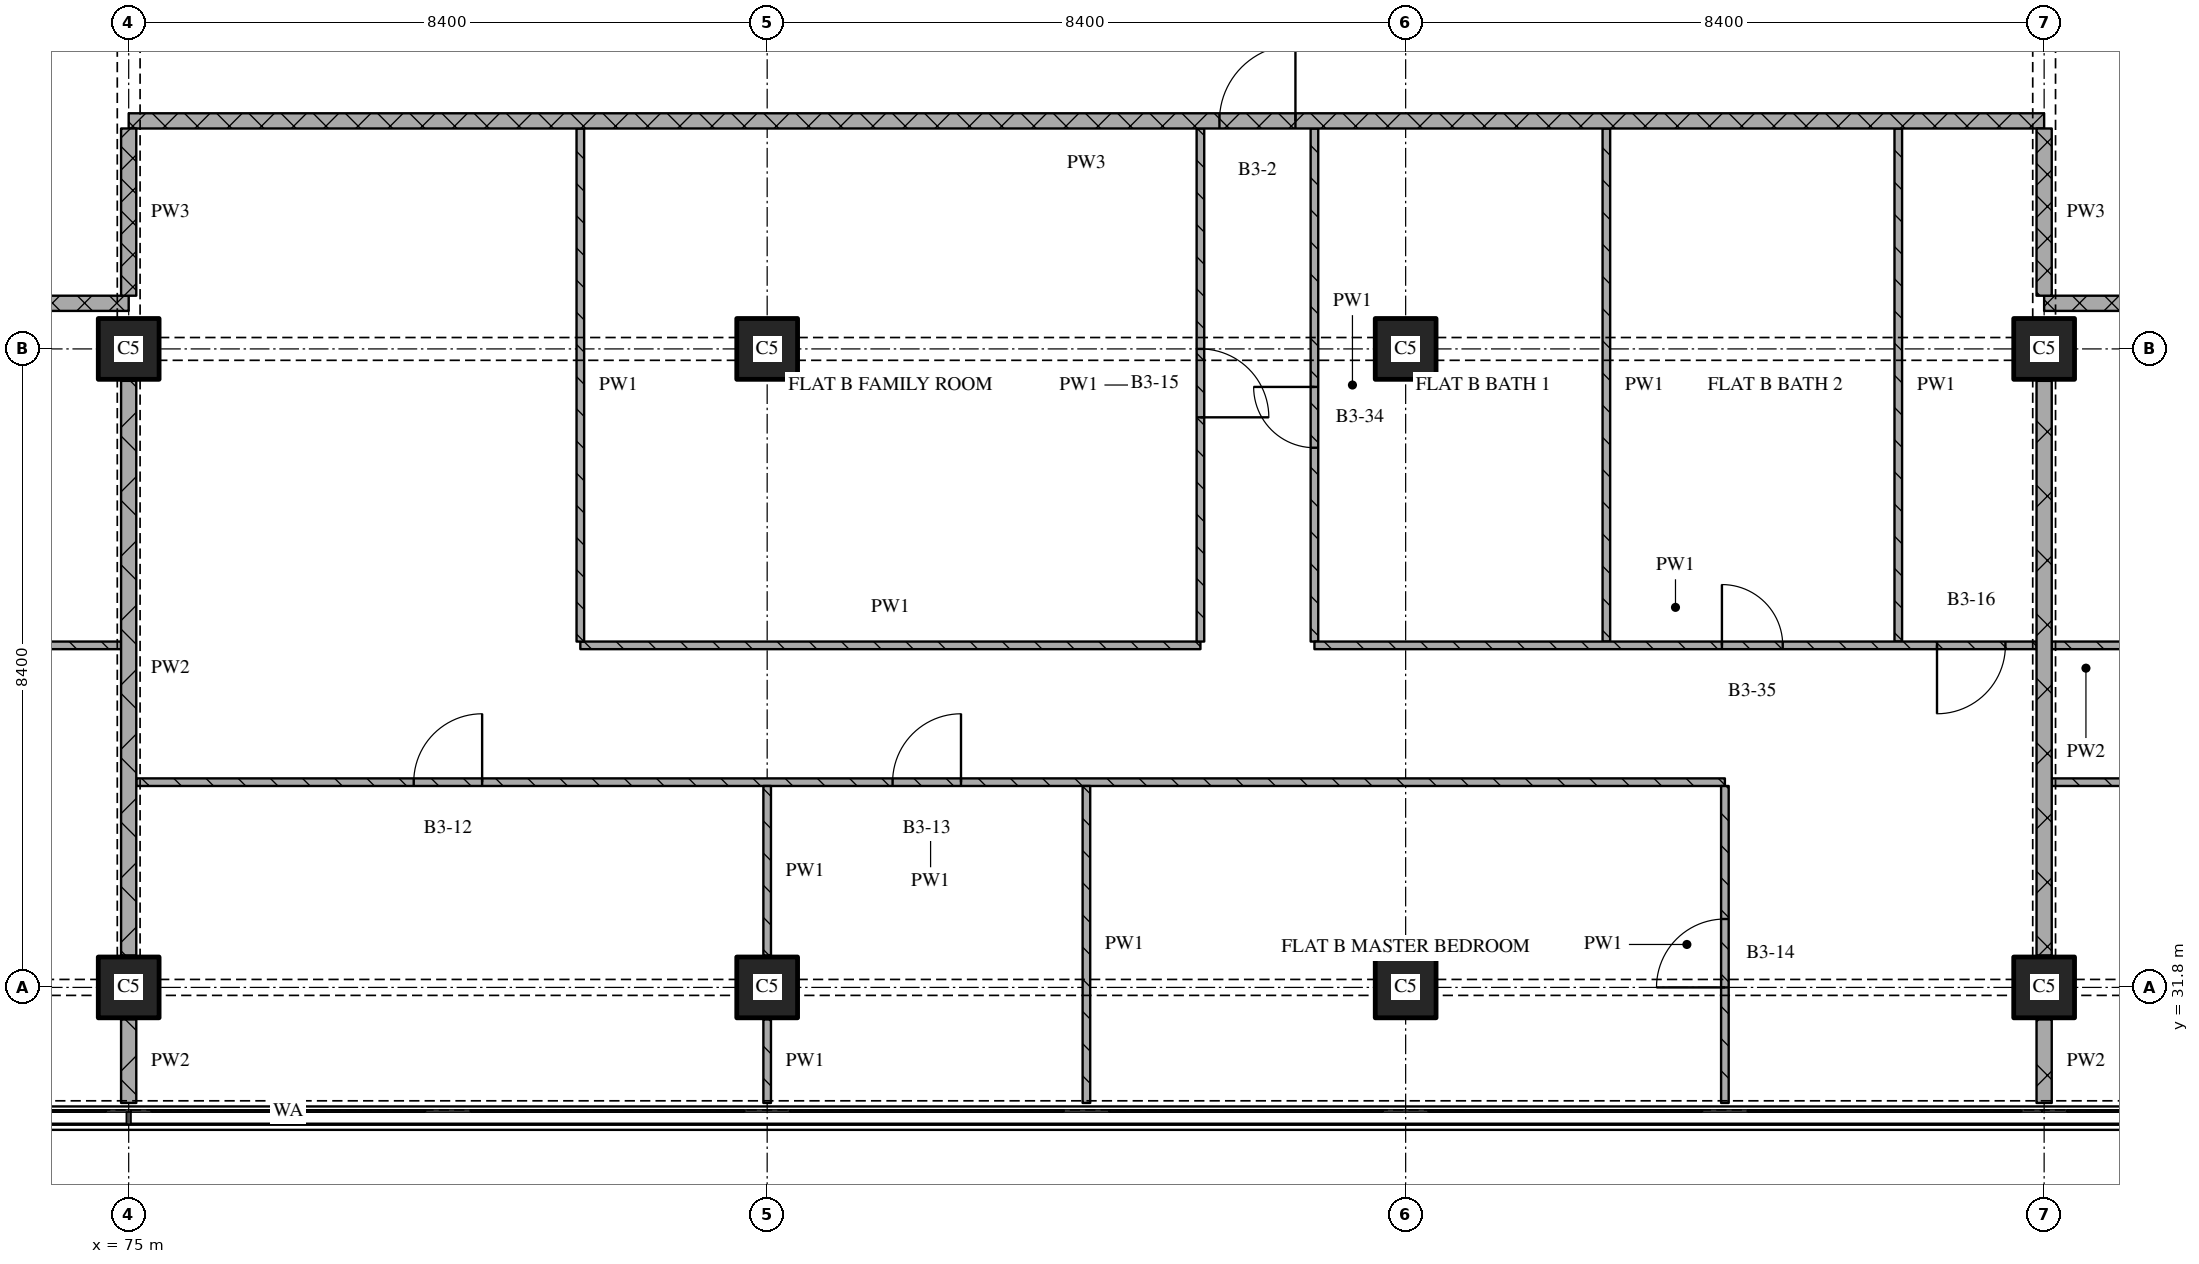
"""IFC4 building model, lengths in metres.
Left out: names, types, materials, properties, quantities, classifications, styles, units other than length and angle.
Written with IfcOpenShell. Run it as: python <this file> out.ifc"""

import sys

from ifc_helpers import new_model, si_unit, direction, frame, frame_2d, origin, origin_2d, place, context, subcontext, project, spatial, rectangle, extrude, element, fill, save


model = new_model("IFC4")
c1 = context("Model", 3, precision=1e-05, world=origin(), true_north=direction((0.0, 1.0)))
c2 = subcontext(c1, "Body", "Model", "MODEL_VIEW")
j1 = project(units=[si_unit("LENGTHUNIT", "METRE"), si_unit("PLANEANGLEUNIT", "RADIAN")], contexts=[c1])
p1 = place(None, origin())
s1 = spatial("IfcSite", under=j1, at=p1, CompositionType="ELEMENT")
p2 = place(p1, origin())
s2 = spatial("IfcBuilding", under=s1, at=p2, CompositionType="ELEMENT")
p3 = place(p2, frame((0.0, 0.0, 124.05)))
s3 = spatial("IfcBuildingStorey", under=s2, at=p3, CompositionType="ELEMENT", Elevation=124.05)
for number, where, z_axis, x_axis in (
    (1, (75.0, 31.8, 0.0), (0.0, 0.0, 1.0), (1.0, 0.0, 0.0)),
    (2, (75.0, 40.2, 0.0), (0.0, 0.0, 1.0), (1.0, 0.0, 0.0)),
    (3, (83.4, 31.8, 0.0), (0.0, 0.0, 1.0), (1.0, 0.0, 0.0)),
    (4, (83.4, 40.2, 0.0), (0.0, 0.0, 1.0), (1.0, 0.0, 0.0)),
    (5, (91.8, 31.8, 0.0), (0.0, 0.0, 1.0), (1.0, 0.0, 0.0)),
    (6, (91.8, 40.2, 0.0), (0.0, 0.0, 1.0), (1.0, 0.0, 0.0)),
    (7, (100.2, 31.8, 0.0), (0.0, 0.0, 1.0), (1.0, 0.0, 0.0)),
    (8, (100.2, 40.2, 0.0), (0.0, 0.0, 1.0), (1.0, 0.0, 0.0)),
):
    element("IfcColumn", number, at=place(p3, frame(where, z_axis=z_axis, x_axis=x_axis)), inside=s3, PredefinedType="COLUMN", context=c2, shape_type="SweptSolid", body=[
        extrude(rectangle(XDim=0.8, YDim=0.8, at=origin_2d()), origin(), (0.0, 0.0, 1.0), 3.6),
    ])
p4 = place(p3, frame((96.0, 34.5, 0.0), z_axis=(0.0, 0.0, 1.0), x_axis=(-1.0, 0.0, 0.0)))
e9 = element("IfcWall", 9, at=p4, inside=s3, PredefinedType="PARTITIONING", context=c2, shape_type="SweptSolid", body=[
    extrude(rectangle(XDim=20.9, YDim=0.1, at=frame_2d((10.45, 0.0))), origin(), (0.0, 0.0, 1.0), 3.32),
])
p5 = place(p4, frame((10.05, 0.0, 0.0)))
e10 = element("IfcOpeningElement", 10, at=p5, cuts=e9, PredefinedType="OPENING", context=c2, shape_type="SweptSolid", body=[
    extrude(rectangle(XDim=0.9, YDim=2.1, at=frame_2d((0.45, 1.05))), frame((0.0, 0.06, 0.0), z_axis=(0.0, -1.0, 0.0), x_axis=(1.0, 0.0, 0.0)), (0.0, 0.0, 1.0), 0.12),
])
p6 = place(p4, frame((16.35, 0.0, 0.0)))
e11 = element("IfcOpeningElement", 11, at=p6, cuts=e9, PredefinedType="OPENING", context=c2, shape_type="SweptSolid", body=[
    extrude(rectangle(XDim=0.9, YDim=2.1, at=frame_2d((0.45, 1.05))), frame((0.0, 0.06, 0.0), z_axis=(0.0, -1.0, 0.0), x_axis=(1.0, 0.0, 0.0)), (0.0, 0.0, 1.0), 0.12),
])
p7 = place(p3, frame((112.8, 34.5, 0.0), z_axis=(0.0, 0.0, 1.0), x_axis=(-1.0, 0.0, 0.0)))
e12 = element("IfcWall", 12, at=p7, inside=s3, PredefinedType="PARTITIONING", context=c2, shape_type="SweptSolid", body=[
    extrude(rectangle(XDim=12.5, YDim=0.1, at=frame_2d((6.25, 0.0))), origin(), (0.0, 0.0, 1.0), 3.32),
])
p8 = place(p7, frame((7.95, 0.0, 0.0)))
e13 = element("IfcOpeningElement", 13, at=p8, cuts=e12, PredefinedType="OPENING", context=c2, shape_type="SweptSolid", body=[
    extrude(rectangle(XDim=0.9, YDim=2.1, at=frame_2d((0.45, 1.05))), frame((0.0, 0.06, 0.0), z_axis=(0.0, -1.0, 0.0), x_axis=(1.0, 0.0, 0.0)), (0.0, 0.0, 1.0), 0.12),
])
p9 = place(p3, frame((64.8, 36.3, 0.0), z_axis=(0.0, 0.0, 1.0), x_axis=(1.0, 0.0, 0.0)))
e14 = element("IfcWall", 14, at=p9, inside=s3, PredefinedType="PARTITIONING", context=c2, shape_type="SweptSolid", body=[
    extrude(rectangle(XDim=10.1, YDim=0.1, at=frame_2d((5.05, 0.0))), origin(), (0.0, 0.0, 1.0), 3.32),
])
p10 = place(p9, frame((6.95, 0.0, 0.0)))
e15 = element("IfcOpeningElement", 15, at=p10, cuts=e14, PredefinedType="OPENING", context=c2, shape_type="SweptSolid", body=[
    extrude(rectangle(XDim=0.8, YDim=2.1, at=frame_2d((0.4, 1.05))), frame((0.0, 0.06, 0.0), z_axis=(0.0, -1.0, 0.0), x_axis=(1.0, 0.0, 0.0)), (0.0, 0.0, 1.0), 0.12),
])
p11 = place(p3, frame((80.942, 36.3, 0.0), z_axis=(0.0, 0.0, 1.0), x_axis=(1.0, 0.0, 0.0)))
e16 = element("IfcWall", 16, at=p11, inside=s3, PredefinedType="PARTITIONING", context=c2, shape_type="SweptSolid", body=[
    extrude(rectangle(XDim=8.158, YDim=0.1, at=frame_2d((4.079, 0.0))), origin(), (0.0, 0.0, 1.0), 3.32),
])
p12 = place(p3, frame((75.0, 40.8, 0.0), z_axis=(0.0, 0.0, 1.0), x_axis=(-1.0, 0.0, 0.0)))
e17 = element("IfcWall", 17, at=p12, inside=s3, PredefinedType="PARTITIONING", context=c2, shape_type="SweptSolid", body=[
    extrude(rectangle(XDim=24.18, YDim=0.2, at=frame_2d((12.09, 0.0))), origin(), (0.0, 0.0, 1.0), 3.32),
])
p13 = place(p12, frame((10.45, 0.0, 0.0)))
e18 = element("IfcOpeningElement", 18, at=p13, cuts=e17, PredefinedType="OPENING", context=c2, shape_type="SweptSolid", body=[
    extrude(rectangle(XDim=1.0, YDim=2.1, at=frame_2d((0.5, 1.05))), frame((0.0, 0.11, 0.0), z_axis=(0.0, -1.0, 0.0), x_axis=(1.0, 0.0, 0.0)), (0.0, 0.0, 1.0), 0.22),
])
p14 = place(p3, frame((124.38, 40.8, 0.0), z_axis=(0.0, 0.0, 1.0), x_axis=(-1.0, 0.0, 0.0)))
e19 = element("IfcWall", 19, at=p14, inside=s3, PredefinedType="PARTITIONING", context=c2, shape_type="SweptSolid", body=[
    extrude(rectangle(XDim=24.18, YDim=0.2, at=frame_2d((12.09, 0.0))), origin(), (0.0, 0.0, 1.0), 3.32),
])
p15 = place(p14, frame((16.33, 0.0, 0.0)))
e20 = element("IfcOpeningElement", 20, at=p15, cuts=e19, PredefinedType="OPENING", context=c2, shape_type="SweptSolid", body=[
    extrude(rectangle(XDim=1.0, YDim=2.1, at=frame_2d((0.5, 1.05))), frame((0.0, 0.11, 0.0), z_axis=(0.0, -1.0, 0.0), x_axis=(1.0, 0.0, 0.0)), (0.0, 0.0, 1.0), 0.22),
])
p16 = place(p3, frame((100.2, 43.2, 0.0), z_axis=(0.0, 0.0, 1.0), x_axis=(-1.0, 0.0, 0.0)))
e21 = element("IfcWall", 21, at=p16, inside=s3, PredefinedType="PARTITIONING", context=c2, shape_type="SweptSolid", body=[
    extrude(rectangle(XDim=25.2, YDim=0.2, at=frame_2d((12.6, 0.0))), origin(), (0.0, 0.0, 1.0), 3.32),
])
p17 = place(p16, frame((9.85, 0.0, 0.0)))
e22 = element("IfcOpeningElement", 22, at=p17, cuts=e21, PredefinedType="OPENING", context=c2, shape_type="SweptSolid", body=[
    extrude(rectangle(XDim=1.0, YDim=2.1, at=frame_2d((0.5, 1.05))), frame((0.0, 0.11, 0.0), z_axis=(0.0, -1.0, 0.0), x_axis=(1.0, 0.0, 0.0)), (0.0, 0.0, 1.0), 0.22),
])
p18 = place(p3, frame((75.0, 43.1, 0.0), z_axis=(0.0, 0.0, 1.0), x_axis=(0.0, -1.0, 0.0)))
e23 = element("IfcWall", 23, at=p18, inside=s3, PredefinedType="PARTITIONING", context=c2, shape_type="SweptSolid", body=[
    extrude(rectangle(XDim=2.2, YDim=0.2, at=frame_2d((1.1, 0.0))), origin(), (0.0, 0.0, 1.0), 2.43),
])
p19 = place(p3, frame((75.0, 31.38, 0.0), z_axis=(0.0, 0.0, 1.0), x_axis=(0.0, -1.0, 0.0)))
e24 = element("IfcWall", 24, at=p19, inside=s3, PredefinedType="PARTITIONING", context=c2, shape_type="SweptSolid", body=[
    extrude(rectangle(XDim=1.1, YDim=0.2, at=frame_2d((0.55, 0.0))), origin(), (0.0, 0.0, 1.0), 3.32),
])
p20 = place(p3, frame((75.0, 39.78, 0.0), z_axis=(0.0, 0.0, 1.0), x_axis=(0.0, -1.0, 0.0)))
e25 = element("IfcWall", 25, at=p20, inside=s3, PredefinedType="PARTITIONING", context=c2, shape_type="SweptSolid", body=[
    extrude(rectangle(XDim=7.56, YDim=0.2, at=frame_2d((3.78, 0.0))), origin(), (0.0, 0.0, 1.0), 2.83),
])
p21 = place(p3, frame((80.942, 43.1, 0.0), z_axis=(0.0, 0.0, 1.0), x_axis=(0.0, -1.0, 0.0)))
e26 = element("IfcWall", 26, at=p21, inside=s3, PredefinedType="PARTITIONING", context=c2, shape_type="SweptSolid", body=[
    extrude(rectangle(XDim=6.75, YDim=0.1, at=frame_2d((3.375, 0.0))), origin(), (0.0, 0.0, 1.0), 3.32),
])
p22 = place(p3, frame((83.4, 31.38, 0.0), z_axis=(0.0, 0.0, 1.0), x_axis=(0.0, -1.0, 0.0)))
e27 = element("IfcWall", 27, at=p22, inside=s3, PredefinedType="PARTITIONING", context=c2, shape_type="SweptSolid", body=[
    extrude(rectangle(XDim=1.1, YDim=0.1, at=frame_2d((0.55, 0.0))), origin(), (0.0, 0.0, 1.0), 3.32),
])
p23 = place(p3, frame((83.4, 34.45, 0.0), z_axis=(0.0, 0.0, 1.0), x_axis=(0.0, -1.0, 0.0)))
e28 = element("IfcWall", 28, at=p23, inside=s3, PredefinedType="PARTITIONING", context=c2, shape_type="SweptSolid", body=[
    extrude(rectangle(XDim=2.23, YDim=0.1, at=frame_2d((1.115, 0.0))), origin(), (0.0, 0.0, 1.0), 3.32),
])
p24 = place(p3, frame((87.6, 34.45, 0.0), z_axis=(0.0, 0.0, 1.0), x_axis=(0.0, -1.0, 0.0)))
e29 = element("IfcWall", 29, at=p24, inside=s3, PredefinedType="PARTITIONING", context=c2, shape_type="SweptSolid", body=[
    extrude(rectangle(XDim=4.17, YDim=0.1, at=frame_2d((2.085, 0.0))), origin(), (0.0, 0.0, 1.0), 3.32),
])
p25 = place(p3, frame((89.1, 36.35, 0.0), z_axis=(0.0, 0.0, 1.0), x_axis=(0.0, 1.0, 0.0)))
e30 = element("IfcWall", 30, at=p25, inside=s3, PredefinedType="PARTITIONING", context=c2, shape_type="SweptSolid", body=[
    extrude(rectangle(XDim=6.75, YDim=0.1, at=frame_2d((3.375, 0.0))), origin(), (0.0, 0.0, 1.0), 3.32),
])
p26 = place(p25, frame((2.95, 0.0, 0.0)))
e31 = element("IfcOpeningElement", 31, at=p26, cuts=e30, PredefinedType="OPENING", context=c2, shape_type="SweptSolid", body=[
    extrude(rectangle(XDim=0.9, YDim=2.1, at=frame_2d((0.45, 1.05))), frame((0.0, 0.06, 0.0), z_axis=(0.0, -1.0, 0.0), x_axis=(1.0, 0.0, 0.0)), (0.0, 0.0, 1.0), 0.12),
])
p27 = place(p3, frame((90.6, 43.1, 0.0), z_axis=(0.0, 0.0, 1.0), x_axis=(0.0, -1.0, 0.0)))
e32 = element("IfcWall", 32, at=p27, inside=s3, PredefinedType="PARTITIONING", context=c2, shape_type="SweptSolid", body=[
    extrude(rectangle(XDim=6.75, YDim=0.1, at=frame_2d((3.375, 0.0))), origin(), (0.0, 0.0, 1.0), 3.32),
])
p28 = place(p27, frame((3.4, 0.0, 0.0)))
e33 = element("IfcOpeningElement", 33, at=p28, cuts=e32, PredefinedType="OPENING", context=c2, shape_type="SweptSolid", body=[
    extrude(rectangle(XDim=0.8, YDim=2.1, at=frame_2d((0.4, 1.05))), frame((0.0, 0.06, 0.0), z_axis=(0.0, -1.0, 0.0), x_axis=(1.0, 0.0, 0.0)), (0.0, 0.0, 1.0), 0.12),
])
p29 = place(p3, frame((94.441, 43.1, 0.0), z_axis=(0.0, 0.0, 1.0), x_axis=(0.0, -1.0, 0.0)))
e34 = element("IfcWall", 34, at=p29, inside=s3, PredefinedType="PARTITIONING", context=c2, shape_type="SweptSolid", body=[
    extrude(rectangle(XDim=6.75, YDim=0.1, at=frame_2d((3.375, 0.0))), origin(), (0.0, 0.0, 1.0), 3.32),
])
p30 = place(p3, frame((96.0, 30.28, 0.0), z_axis=(0.0, 0.0, 1.0), x_axis=(0.0, 1.0, 0.0)))
e35 = element("IfcWall", 35, at=p30, inside=s3, PredefinedType="PARTITIONING", context=c2, shape_type="SweptSolid", body=[
    extrude(rectangle(XDim=4.17, YDim=0.1, at=frame_2d((2.085, 0.0))), origin(), (0.0, 0.0, 1.0), 3.32),
])
p31 = place(p30, frame((1.52, 0.0, 0.0)))
e36 = element("IfcOpeningElement", 36, at=p31, cuts=e35, PredefinedType="OPENING", context=c2, shape_type="SweptSolid", body=[
    extrude(rectangle(XDim=0.9, YDim=2.1, at=frame_2d((0.45, 1.05))), frame((0.0, 0.06, 0.0), z_axis=(0.0, -1.0, 0.0), x_axis=(1.0, 0.0, 0.0)), (0.0, 0.0, 1.0), 0.12),
])
p32 = place(p3, frame((98.281, 43.1, 0.0), z_axis=(0.0, 0.0, 1.0), x_axis=(0.0, -1.0, 0.0)))
e37 = element("IfcWall", 37, at=p32, inside=s3, PredefinedType="PARTITIONING", context=c2, shape_type="SweptSolid", body=[
    extrude(rectangle(XDim=6.75, YDim=0.1, at=frame_2d((3.375, 0.0))), origin(), (0.0, 0.0, 1.0), 3.32),
])
p33 = place(p3, frame((100.2, 43.1, 0.0), z_axis=(0.0, 0.0, 1.0), x_axis=(0.0, -1.0, 0.0)))
e38 = element("IfcWall", 38, at=p33, inside=s3, PredefinedType="PARTITIONING", context=c2, shape_type="SweptSolid", body=[
    extrude(rectangle(XDim=2.2, YDim=0.2, at=frame_2d((1.1, 0.0))), origin(), (0.0, 0.0, 1.0), 2.43),
])
p34 = place(p3, frame((100.2, 31.38, 0.0), z_axis=(0.0, 0.0, 1.0), x_axis=(0.0, -1.0, 0.0)))
e39 = element("IfcWall", 39, at=p34, inside=s3, PredefinedType="PARTITIONING", context=c2, shape_type="SweptSolid", body=[
    extrude(rectangle(XDim=1.1, YDim=0.2, at=frame_2d((0.55, 0.0))), origin(), (0.0, 0.0, 1.0), 3.32),
])
p35 = place(p3, frame((100.2, 39.78, 0.0), z_axis=(0.0, 0.0, 1.0), x_axis=(0.0, -1.0, 0.0)))
e40 = element("IfcWall", 40, at=p35, inside=s3, PredefinedType="PARTITIONING", context=c2, shape_type="SweptSolid", body=[
    extrude(rectangle(XDim=7.56, YDim=0.2, at=frame_2d((3.78, 0.0))), origin(), (0.0, 0.0, 1.0), 2.83),
])
p36 = place(p3, frame((90.6, 36.3, 0.0), z_axis=(0.0, 0.0, 1.0), x_axis=(1.0, 0.0, 0.0)))
e41 = element("IfcWall", 41, at=p36, inside=s3, PredefinedType="PARTITIONING", context=c2, shape_type="SweptSolid", body=[
    extrude(rectangle(XDim=9.5, YDim=0.1, at=frame_2d((4.75, 0.0))), origin(), (0.0, 0.0, 1.0), 3.32),
])
p37 = place(p36, frame((5.361, 0.0, 0.0)))
e42 = element("IfcOpeningElement", 42, at=p37, cuts=e41, PredefinedType="OPENING", context=c2, shape_type="SweptSolid", body=[
    extrude(rectangle(XDim=0.8, YDim=2.1, at=frame_2d((0.4, 1.05))), frame((0.0, 0.06, 0.0), z_axis=(0.0, -1.0, 0.0), x_axis=(1.0, 0.0, 0.0)), (0.0, 0.0, 1.0), 0.12),
])
p38 = place(p36, frame((8.191, 0.0, 0.0)))
e43 = element("IfcOpeningElement", 43, at=p38, cuts=e41, PredefinedType="OPENING", context=c2, shape_type="SweptSolid", body=[
    extrude(rectangle(XDim=0.9, YDim=2.1, at=frame_2d((0.45, 1.05))), frame((0.0, 0.06, 0.0), z_axis=(0.0, -1.0, 0.0), x_axis=(1.0, 0.0, 0.0)), (0.0, 0.0, 1.0), 0.12),
])
p39 = place(p3, frame((100.3, 36.3, 0.0), z_axis=(0.0, 0.0, 1.0), x_axis=(1.0, 0.0, 0.0)))
e44 = element("IfcWall", 44, at=p39, inside=s3, PredefinedType="PARTITIONING", context=c2, shape_type="SweptSolid", body=[
    extrude(rectangle(XDim=6.5, YDim=0.1, at=frame_2d((3.25, 0.0))), origin(), (0.0, 0.0, 1.0), 3.32),
])
p40 = place(p39, frame((1.75, 0.0, 0.0)))
e45 = element("IfcOpeningElement", 45, at=p40, cuts=e44, PredefinedType="OPENING", context=c2, shape_type="SweptSolid", body=[
    extrude(rectangle(XDim=0.8, YDim=2.1, at=frame_2d((0.4, 1.05))), frame((0.0, 0.06, 0.0), z_axis=(0.0, -1.0, 0.0), x_axis=(1.0, 0.0, 0.0)), (0.0, 0.0, 1.0), 0.12),
])
p41 = place(p5, origin())
e46 = element("IfcDoor", 46, at=p41, inside=s3, OperationType="SINGLE_SWING_RIGHT", PredefinedType="DOOR", context=c2, shape_type="SweptSolid", body=[
    extrude(rectangle(XDim=0.9, YDim=2.1, at=frame_2d((0.45, 1.05))), frame((0.0, 0.025, 0.0), z_axis=(0.0, -1.0, 0.0), x_axis=(1.0, 0.0, 0.0)), (0.0, 0.0, 1.0), 0.05),
])
fill(e10, e46)
p42 = place(p6, origin())
e47 = element("IfcDoor", 47, at=p42, inside=s3, OperationType="SINGLE_SWING_RIGHT", PredefinedType="DOOR", context=c2, shape_type="SweptSolid", body=[
    extrude(rectangle(XDim=0.9, YDim=2.1, at=frame_2d((0.45, 1.05))), frame((0.0, 0.025, 0.0), z_axis=(0.0, -1.0, 0.0), x_axis=(1.0, 0.0, 0.0)), (0.0, 0.0, 1.0), 0.05),
])
fill(e11, e47)
p43 = place(p17, origin())
e48 = element("IfcDoor", 48, at=p43, inside=s3, OperationType="SINGLE_SWING_RIGHT", PredefinedType="DOOR", context=c2, shape_type="SweptSolid", body=[
    extrude(rectangle(XDim=1.0, YDim=2.1, at=frame_2d((0.5, 1.05))), frame((0.0, 0.025, 0.0), z_axis=(0.0, -1.0, 0.0), x_axis=(1.0, 0.0, 0.0)), (0.0, 0.0, 1.0), 0.05),
])
fill(e22, e48)
p44 = place(p26, origin())
e49 = element("IfcDoor", 49, at=p44, inside=s3, OperationType="SINGLE_SWING_RIGHT", PredefinedType="DOOR", context=c2, shape_type="SweptSolid", body=[
    extrude(rectangle(XDim=0.9, YDim=2.1, at=frame_2d((0.45, 1.05))), frame((0.0, 0.025, 0.0), z_axis=(0.0, -1.0, 0.0), x_axis=(1.0, 0.0, 0.0)), (0.0, 0.0, 1.0), 0.05),
])
fill(e31, e49)
p45 = place(p28, origin())
e50 = element("IfcDoor", 50, at=p45, inside=s3, OperationType="SINGLE_SWING_RIGHT", PredefinedType="DOOR", context=c2, shape_type="SweptSolid", body=[
    extrude(rectangle(XDim=0.8, YDim=2.1, at=frame_2d((0.4, 1.05))), frame((0.0, 0.025, 0.0), z_axis=(0.0, -1.0, 0.0), x_axis=(1.0, 0.0, 0.0)), (0.0, 0.0, 1.0), 0.05),
])
fill(e33, e50)
p46 = place(p31, origin())
e51 = element("IfcDoor", 51, at=p46, inside=s3, OperationType="SINGLE_SWING_LEFT", PredefinedType="DOOR", context=c2, shape_type="SweptSolid", body=[
    extrude(rectangle(XDim=0.9, YDim=2.1, at=frame_2d((0.45, 1.05))), frame((0.0, 0.025, 0.0), z_axis=(0.0, -1.0, 0.0), x_axis=(1.0, 0.0, 0.0)), (0.0, 0.0, 1.0), 0.05),
])
fill(e36, e51)
p47 = place(p37, origin())
e52 = element("IfcDoor", 52, at=p47, inside=s3, OperationType="SINGLE_SWING_LEFT", PredefinedType="DOOR", context=c2, shape_type="SweptSolid", body=[
    extrude(rectangle(XDim=0.8, YDim=2.1, at=frame_2d((0.4, 1.05))), frame((0.0, 0.025, 0.0), z_axis=(0.0, -1.0, 0.0), x_axis=(1.0, 0.0, 0.0)), (0.0, 0.0, 1.0), 0.05),
])
fill(e42, e52)
p48 = place(p38, origin())
e53 = element("IfcDoor", 53, at=p48, inside=s3, OperationType="SINGLE_SWING_RIGHT", PredefinedType="DOOR", context=c2, shape_type="SweptSolid", body=[
    extrude(rectangle(XDim=0.9, YDim=2.1, at=frame_2d((0.45, 1.05))), frame((0.0, 0.025, 0.0), z_axis=(0.0, -1.0, 0.0), x_axis=(1.0, 0.0, 0.0)), (0.0, 0.0, 1.0), 0.05),
])
fill(e43, e53)
save(model, sys.argv[1])
